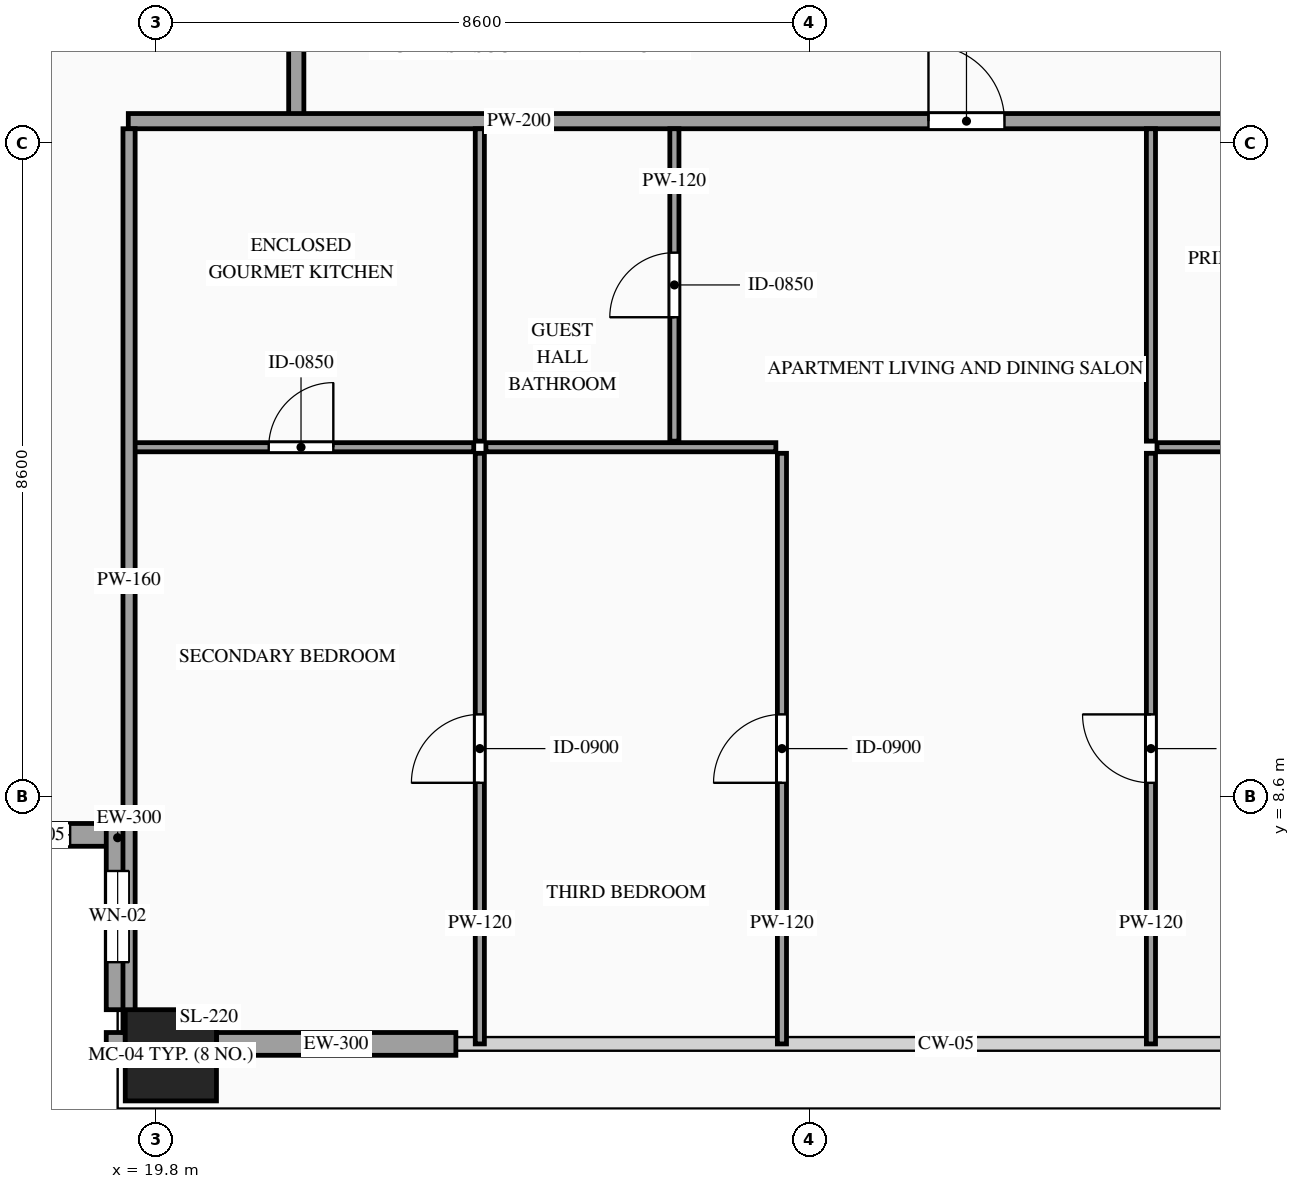
"""IFC4 building model, lengths in metres.
Left out: names, types, materials, properties, quantities, classifications, styles, units other than length and angle.
Written with IfcOpenShell. Run it as: python <this file> out.ifc"""

import sys

from ifc_helpers import new_model, si_unit, direction, frame, frame_2d, origin, origin_2d, place, context, subcontext, project, spatial, rectangle, hollow_rectangle, extrude, source, transform, mapped, element, fill, save


model = new_model("IFC4")
c1 = context("Model", 3, precision=1e-05, world=origin(), true_north=direction((0.0, 1.0)))
c2 = subcontext(c1, "Body", "Model", "MODEL_VIEW")
j1 = project(units=[si_unit("LENGTHUNIT", "METRE"), si_unit("PLANEANGLEUNIT", "RADIAN")], contexts=[c1])
p1 = place(None, origin())
s1 = spatial("IfcSite", under=j1, at=p1, CompositionType="ELEMENT")
p2 = place(p1, origin())
s2 = spatial("IfcBuilding", under=s1, at=p2, CompositionType="ELEMENT")
p3 = place(p2, frame((0.0, 0.0, 282.1)))
s3 = spatial("IfcBuildingStorey", under=s2, at=p3, CompositionType="ELEMENT", Elevation=282.1)
m1 = source(origin(), c2, "Body", "SweptSolid", [
    extrude(hollow_rectangle(XDim=1.2, YDim=1.2, WallThickness=0.055, at=origin_2d()), origin(), (0.0, 0.0, 1.0), 3.28),
])
p4 = place(p3, frame((20.0, 5.2, 0.0), z_axis=(0.0, 0.0, 1.0), x_axis=(1.0, 0.0, 0.0)))
e1 = element("IfcColumn", 1, at=p4, inside=s3, PredefinedType="COLUMN", context=c2, shape_type="MappedRepresentation", body=[
    mapped(m1, transform((0.0, 0.0, 0.0), scale=1.0)),
])
p5 = place(p3, frame((17.0, 8.1, 0.0), z_axis=(0.0, 0.0, 1.0), x_axis=(1.0, 0.0, 0.0)))
e2 = element("IfcWall", 2, at=p5, inside=s3, PredefinedType="SOLIDWALL", context=c2, shape_type="SweptSolid", body=[
    extrude(rectangle(XDim=2.45, YDim=0.3, at=frame_2d((1.225, 0.0))), origin(), (0.0, 0.0, 1.0), 3.28),
])
p6 = place(p5, frame((0.775, 0.0, 0.85)))
e3 = element("IfcOpeningElement", 3, at=p6, cuts=e2, PredefinedType="OPENING", context=c2, shape_type="SweptSolid", body=[
    extrude(rectangle(XDim=0.9, YDim=1.5, at=frame_2d((0.45, 0.75))), frame((0.0, 0.165, 0.0), z_axis=(0.0, -1.0, 0.0), x_axis=(1.0, 0.0, 0.0)), (0.0, 0.0, 1.0), 0.33),
])
p7 = place(p3, frame((19.3, 8.25, 0.0), z_axis=(0.0, 0.0, 1.0), x_axis=(0.0, -1.0, 0.0)))
e4 = element("IfcWall", 4, at=p7, inside=s3, PredefinedType="SOLIDWALL", context=c2, shape_type="SweptSolid", body=[
    extrude(rectangle(XDim=2.45, YDim=0.3, at=frame_2d((1.225, 0.0))), origin(), (0.0, 0.0, 1.0), 3.28),
])
p8 = place(p7, frame((0.625, 0.0, 0.85)))
e5 = element("IfcOpeningElement", 5, at=p8, cuts=e4, PredefinedType="OPENING", context=c2, shape_type="SweptSolid", body=[
    extrude(rectangle(XDim=1.2, YDim=2.1, at=frame_2d((0.6, 1.05))), frame((0.0, 0.165, 0.0), z_axis=(0.0, -1.0, 0.0), x_axis=(1.0, 0.0, 0.0)), (0.0, 0.0, 1.0), 0.33),
])
m2 = source(origin(), c2, "Body", "SweptSolid", [
    extrude(rectangle(XDim=0.25, YDim=0.3, at=frame_2d((0.125, 0.0))), origin(), (0.0, 0.0, 1.0), 3.28),
])
p9 = place(p3, frame((19.15, 5.35, 0.0), z_axis=(0.0, 0.0, 1.0), x_axis=(1.0, 0.0, 0.0)))
e6 = element("IfcWall", 6, at=p9, inside=s3, PredefinedType="SOLIDWALL", context=c2, shape_type="MappedRepresentation", body=[
    mapped(m2, transform((0.0, 0.0, 0.0), scale=1.0)),
])
m3 = source(origin(), c2, "Body", "SweptSolid", [
    extrude(rectangle(XDim=3.15, YDim=0.3, at=frame_2d((1.575, 0.0))), origin(), (0.0, 0.0, 1.0), 2.835),
])
p10 = place(p3, frame((20.6, 5.35, 0.0), z_axis=(0.0, 0.0, 1.0), x_axis=(1.0, 0.0, 0.0)))
e7 = element("IfcWall", 7, at=p10, inside=s3, PredefinedType="SOLIDWALL", context=c2, shape_type="MappedRepresentation", body=[
    mapped(m3, transform((0.0, 0.0, 0.0), scale=1.0)),
])
m4 = source(origin(), c2, "Body", "SweptSolid", [
    extrude(rectangle(XDim=1.7, YDim=0.2, at=frame_2d((0.85, 0.0))), origin(), (0.0, 0.0, 1.0), 3.28),
])
p11 = place(p3, frame((21.65, 17.55, 0.0), z_axis=(0.0, 0.0, 1.0), x_axis=(0.0, 1.0, 0.0)))
e8 = element("IfcWall", 8, at=p11, inside=s3, PredefinedType="PARTITIONING", context=c2, shape_type="MappedRepresentation", body=[
    mapped(m4, transform((0.0, 0.0, 0.0), scale=1.0)),
])
p12 = place(p3, frame((19.44, 17.49, 0.0), z_axis=(0.0, 0.0, 1.0), x_axis=(1.0, 0.0, 0.0)))
e9 = element("IfcWall", 9, at=p12, inside=s3, PredefinedType="PARTITIONING", context=c2, shape_type="SweptSolid", body=[
    extrude(rectangle(XDim=18.182, YDim=0.2, at=frame_2d((9.091, 0.0))), origin(), (0.0, 0.0, 1.0), 3.28),
])
p13 = place(p12, frame((10.528, 0.0, 0.0)))
e10 = element("IfcOpeningElement", 10, at=p13, cuts=e9, PredefinedType="OPENING", context=c2, shape_type="SweptSolid", body=[
    extrude(rectangle(XDim=1.0, YDim=2.2, at=frame_2d((0.5, 1.1))), frame((0.0, 0.115, 0.0), z_axis=(0.0, -1.0, 0.0), x_axis=(1.0, 0.0, 0.0)), (0.0, 0.0, 1.0), 0.23),
])
p14 = place(p3, frame((19.44, 13.2, 0.0), z_axis=(0.0, 0.0, 1.0), x_axis=(1.0, 0.0, 0.0)))
e11 = element("IfcWall", 11, at=p14, inside=s3, PredefinedType="PARTITIONING", context=c2, shape_type="SweptSolid", body=[
    extrude(rectangle(XDim=4.545, YDim=0.12, at=frame_2d((2.272, 0.0))), origin(), (0.0, 0.0, 1.0), 3.28),
])
p15 = place(p14, frame((1.847, 0.0, 0.0)))
e12 = element("IfcOpeningElement", 12, at=p15, cuts=e11, PredefinedType="OPENING", context=c2, shape_type="SweptSolid", body=[
    extrude(rectangle(XDim=0.85, YDim=2.1, at=frame_2d((0.425, 1.05))), frame((0.0, 0.075, 0.0), z_axis=(0.0, -1.0, 0.0), x_axis=(1.0, 0.0, 0.0)), (0.0, 0.0, 1.0), 0.15),
])
m5 = source(origin(), c2, "Body", "SweptSolid", [
    extrude(rectangle(XDim=4.11, YDim=0.12, at=frame_2d((2.055, 0.0))), origin(), (0.0, 0.0, 1.0), 3.28),
])
p16 = place(p3, frame((24.065, 13.28, 0.0), z_axis=(0.0, 0.0, 1.0), x_axis=(0.0, 1.0, 0.0)))
e13 = element("IfcWall", 13, at=p16, inside=s3, PredefinedType="PARTITIONING", context=c2, shape_type="MappedRepresentation", body=[
    mapped(m5, transform((0.0, 0.0, 0.0), scale=1.0)),
])
p17 = place(p3, frame((26.625, 13.28, 0.0), z_axis=(0.0, 0.0, 1.0), x_axis=(0.0, 1.0, 0.0)))
e14 = element("IfcWall", 14, at=p17, inside=s3, PredefinedType="PARTITIONING", context=c2, shape_type="SweptSolid", body=[
    extrude(rectangle(XDim=4.11, YDim=0.12, at=frame_2d((2.055, 0.0))), origin(), (0.0, 0.0, 1.0), 3.28),
])
p18 = place(p17, frame((1.63, 0.0, 0.0)))
e15 = element("IfcOpeningElement", 15, at=p18, cuts=e14, PredefinedType="OPENING", context=c2, shape_type="SweptSolid", body=[
    extrude(rectangle(XDim=0.85, YDim=2.1, at=frame_2d((0.425, 1.05))), frame((0.0, 0.075, 0.0), z_axis=(0.0, -1.0, 0.0), x_axis=(1.0, 0.0, 0.0)), (0.0, 0.0, 1.0), 0.15),
])
p19 = place(p3, frame((32.975, 13.2, 0.0), z_axis=(0.0, 0.0, 1.0), x_axis=(1.0, 0.0, 0.0)))
e16 = element("IfcWall", 16, at=p19, inside=s3, PredefinedType="PARTITIONING", context=c2, shape_type="SweptSolid", body=[
    extrude(rectangle(XDim=4.647, YDim=0.12, at=frame_2d((2.323, 0.0))), origin(), (0.0, 0.0, 1.0), 3.28),
])
p20 = place(p19, frame((1.898, 0.0, 0.0)))
e17 = element("IfcOpeningElement", 17, at=p20, cuts=e16, PredefinedType="OPENING", context=c2, shape_type="SweptSolid", body=[
    extrude(rectangle(XDim=0.85, YDim=2.1, at=frame_2d((0.425, 1.05))), frame((0.0, 0.075, 0.0), z_axis=(0.0, -1.0, 0.0), x_axis=(1.0, 0.0, 0.0)), (0.0, 0.0, 1.0), 0.15),
])
p21 = place(p3, frame((32.895, 13.28, 0.0), z_axis=(0.0, 0.0, 1.0), x_axis=(0.0, 1.0, 0.0)))
e18 = element("IfcWall", 18, at=p21, inside=s3, PredefinedType="PARTITIONING", context=c2, shape_type="MappedRepresentation", body=[
    mapped(m5, transform((0.0, 0.0, 0.0), scale=1.0)),
])
p22 = place(p3, frame((24.065, 5.35, 0.0), z_axis=(0.0, 0.0, 1.0), x_axis=(0.0, 1.0, 0.0)))
e19 = element("IfcWall", 19, at=p22, inside=s3, PredefinedType="PARTITIONING", context=c2, shape_type="SweptSolid", body=[
    extrude(rectangle(XDim=7.77, YDim=0.12, at=frame_2d((3.885, 0.0))), origin(), (0.0, 0.0, 1.0), 3.28),
])
p23 = place(p22, frame((3.435, 0.0, 0.0)))
e20 = element("IfcOpeningElement", 20, at=p23, cuts=e19, PredefinedType="OPENING", context=c2, shape_type="SweptSolid", body=[
    extrude(rectangle(XDim=0.9, YDim=2.15, at=frame_2d((0.45, 1.075))), frame((0.0, 0.075, 0.0), z_axis=(0.0, -1.0, 0.0), x_axis=(1.0, 0.0, 0.0)), (0.0, 0.0, 1.0), 0.15),
])
p24 = place(p3, frame((32.895, 5.35, 0.0), z_axis=(0.0, 0.0, 1.0), x_axis=(0.0, 1.0, 0.0)))
e21 = element("IfcWall", 21, at=p24, inside=s3, PredefinedType="PARTITIONING", context=c2, shape_type="SweptSolid", body=[
    extrude(rectangle(XDim=7.77, YDim=0.12, at=frame_2d((3.885, 0.0))), origin(), (0.0, 0.0, 1.0), 3.28),
])
p25 = place(p24, frame((3.435, 0.0, 0.0)))
e22 = element("IfcOpeningElement", 22, at=p25, cuts=e21, PredefinedType="OPENING", context=c2, shape_type="SweptSolid", body=[
    extrude(rectangle(XDim=0.9, YDim=2.15, at=frame_2d((0.45, 1.075))), frame((0.0, 0.075, 0.0), z_axis=(0.0, -1.0, 0.0), x_axis=(1.0, 0.0, 0.0)), (0.0, 0.0, 1.0), 0.15),
])
m6 = source(origin(), c2, "Body", "SweptSolid", [
    extrude(rectangle(XDim=3.815, YDim=0.12, at=frame_2d((1.907, 0.0))), origin(), (0.0, 0.0, 1.0), 3.28),
])
p26 = place(p3, frame((24.145, 13.2, 0.0), z_axis=(0.0, 0.0, 1.0), x_axis=(1.0, 0.0, 0.0)))
e23 = element("IfcWall", 23, at=p26, inside=s3, PredefinedType="PARTITIONING", context=c2, shape_type="MappedRepresentation", body=[
    mapped(m6, transform((0.0, 0.0, 0.0), scale=1.0)),
])
p27 = place(p3, frame((28.04, 5.35, 0.0), z_axis=(0.0, 0.0, 1.0), x_axis=(0.0, 1.0, 0.0)))
e24 = element("IfcWall", 24, at=p27, inside=s3, PredefinedType="PARTITIONING", context=c2, shape_type="SweptSolid", body=[
    extrude(rectangle(XDim=7.77, YDim=0.12, at=frame_2d((3.885, 0.0))), origin(), (0.0, 0.0, 1.0), 3.28),
])
p28 = place(p27, frame((3.435, 0.0, 0.0)))
e25 = element("IfcOpeningElement", 25, at=p28, cuts=e24, PredefinedType="OPENING", context=c2, shape_type="SweptSolid", body=[
    extrude(rectangle(XDim=0.9, YDim=2.15, at=frame_2d((0.45, 1.075))), frame((0.0, 0.075, 0.0), z_axis=(0.0, -1.0, 0.0), x_axis=(1.0, 0.0, 0.0)), (0.0, 0.0, 1.0), 0.15),
])
m7 = source(origin(), c2, "Body", "SweptSolid", [
    extrude(rectangle(XDim=11.89, YDim=0.16, at=frame_2d((5.945, 0.0))), origin(), (0.0, 0.0, 1.0), 3.28),
])
p29 = place(p3, frame((19.45, 5.5, 0.0), z_axis=(0.0, 0.0, 1.0), x_axis=(0.0, 1.0, 0.0)))
e26 = element("IfcWall", 26, at=p29, inside=s3, PredefinedType="PARTITIONING", context=c2, shape_type="MappedRepresentation", body=[
    mapped(m7, transform((0.0, 0.0, 0.0), scale=1.0)),
])
m8 = source(origin(), c2, "Body", "SweptSolid", [
    extrude(rectangle(XDim=0.9, YDim=1.5, at=frame_2d((0.45, 0.75))), frame((0.0, 0.03, 0.0), z_axis=(0.0, -1.0, 0.0), x_axis=(1.0, 0.0, 0.0)), (0.0, 0.0, 1.0), 0.06),
])
p30 = place(p6, origin())
e27 = element("IfcWindow", 27, at=p30, inside=s3, PartitioningType="SINGLE_PANEL", PredefinedType="WINDOW", context=c2, shape_type="MappedRepresentation", body=[
    mapped(m8, transform((0.0, 0.0, 0.0), scale=1.0)),
])
fill(e3, e27)
m9 = source(origin(), c2, "Body", "SweptSolid", [
    extrude(rectangle(XDim=1.2, YDim=2.1, at=frame_2d((0.6, 1.05))), frame((0.0, 0.03, 0.0), z_axis=(0.0, -1.0, 0.0), x_axis=(1.0, 0.0, 0.0)), (0.0, 0.0, 1.0), 0.06),
])
p31 = place(p8, origin())
e28 = element("IfcWindow", 28, at=p31, inside=s3, PartitioningType="SINGLE_PANEL", PredefinedType="WINDOW", context=c2, shape_type="MappedRepresentation", body=[
    mapped(m9, transform((0.0, 0.0, 0.0), scale=1.0)),
])
fill(e5, e28)
m10 = source(origin(), c2, "Body", "SweptSolid", [
    extrude(rectangle(XDim=1.0, YDim=2.2, at=frame_2d((0.5, 1.1))), frame((0.0, 0.025, 0.0), z_axis=(0.0, -1.0, 0.0), x_axis=(1.0, 0.0, 0.0)), (0.0, 0.0, 1.0), 0.05),
])
p32 = place(p13, origin())
e29 = element("IfcDoor", 29, at=p32, inside=s3, OperationType="SINGLE_SWING_LEFT", PredefinedType="DOOR", context=c2, shape_type="MappedRepresentation", body=[
    mapped(m10, transform((0.0, 0.0, 0.0), scale=1.0)),
])
fill(e10, e29)
m11 = source(origin(), c2, "Body", "SweptSolid", [
    extrude(rectangle(XDim=0.85, YDim=2.1, at=frame_2d((0.425, 1.05))), frame((0.0, 0.025, 0.0), z_axis=(0.0, -1.0, 0.0), x_axis=(1.0, 0.0, 0.0)), (0.0, 0.0, 1.0), 0.05),
])
p33 = place(p15, origin())
e30 = element("IfcDoor", 30, at=p33, inside=s3, OperationType="SINGLE_SWING_RIGHT", PredefinedType="DOOR", context=c2, shape_type="MappedRepresentation", body=[
    mapped(m11, transform((0.0, 0.0, 0.0), scale=1.0)),
])
fill(e12, e30)
p34 = place(p18, origin())
e31 = element("IfcDoor", 31, at=p34, inside=s3, OperationType="SINGLE_SWING_LEFT", PredefinedType="DOOR", context=c2, shape_type="MappedRepresentation", body=[
    mapped(m11, transform((0.0, 0.0, 0.0), scale=1.0)),
])
fill(e15, e31)
m12 = source(origin(), c2, "Body", "SweptSolid", [
    extrude(rectangle(XDim=0.9, YDim=2.15, at=frame_2d((0.45, 1.075))), frame((0.0, 0.025, 0.0), z_axis=(0.0, -1.0, 0.0), x_axis=(1.0, 0.0, 0.0)), (0.0, 0.0, 1.0), 0.05),
])
p35 = place(p23, origin())
e32 = element("IfcDoor", 32, at=p35, inside=s3, OperationType="SINGLE_SWING_LEFT", PredefinedType="DOOR", context=c2, shape_type="MappedRepresentation", body=[
    mapped(m12, transform((0.0, 0.0, 0.0), scale=1.0)),
])
fill(e20, e32)
p36 = place(p25, origin())
e33 = element("IfcDoor", 33, at=p36, inside=s3, OperationType="SINGLE_SWING_RIGHT", PredefinedType="DOOR", context=c2, shape_type="MappedRepresentation", body=[
    mapped(m12, transform((0.0, 0.0, 0.0), scale=1.0)),
])
fill(e22, e33)
p37 = place(p28, origin())
e34 = element("IfcDoor", 34, at=p37, inside=s3, OperationType="SINGLE_SWING_LEFT", PredefinedType="DOOR", context=c2, shape_type="MappedRepresentation", body=[
    mapped(m12, transform((0.0, 0.0, 0.0), scale=1.0)),
])
fill(e25, e34)
save(model, sys.argv[1])
